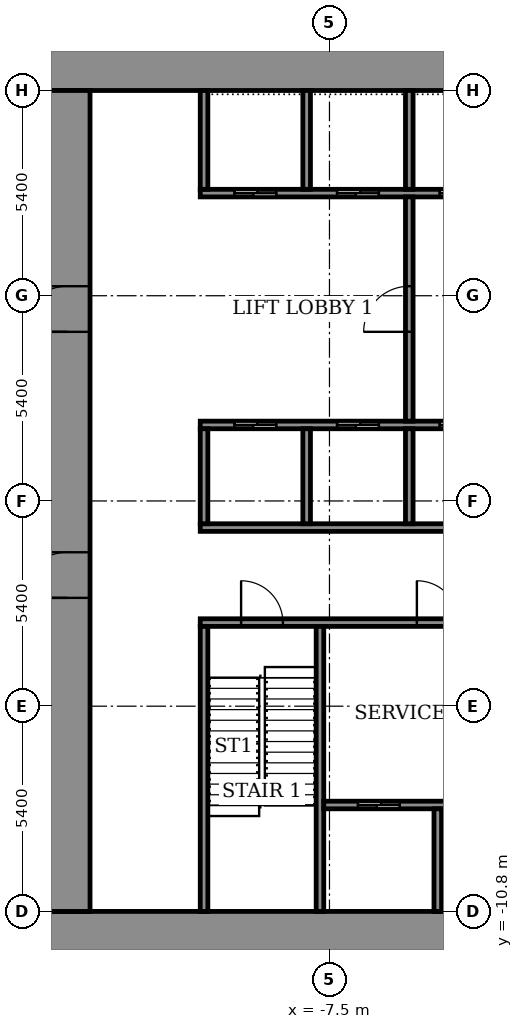
"""IFC4 building model, lengths in metres.
Left out: names, types, materials, properties, quantities, classifications, styles, units other than length and angle.
Written with IfcOpenShell. Run it as: python <this file> out.ifc"""

import sys

from ifc_helpers import new_model, si_unit, direction, frame, frame_2d, origin, place, context, subcontext, project, spatial, rectangle, extrude, element, fill, save


model = new_model("IFC4")
c1 = context("Model", 3, precision=1e-05, world=origin(), true_north=direction((0.0, 1.0)))
c2 = subcontext(c1, "Body", "Model", "MODEL_VIEW")
j1 = project(units=[si_unit("LENGTHUNIT", "METRE"), si_unit("PLANEANGLEUNIT", "RADIAN")], contexts=[c1])
p1 = place(None, origin())
s1 = spatial("IfcSite", under=j1, at=p1, CompositionType="ELEMENT")
p2 = place(p1, origin())
s2 = spatial("IfcBuilding", under=s1, at=p2, CompositionType="ELEMENT")
p3 = place(p2, frame((0.0, 0.0, 29.5)))
s3 = spatial("IfcBuildingStorey", under=s2, at=p3, CompositionType="ELEMENT", Elevation=29.5)
for number, where, z_axis, x_axis in (
    (1, (-15.0, -11.4, 0.0), (0.0, 0.0, 1.0), (1.0, 0.0, 0.0)),
    (2, (-15.0, 11.4, 0.0), (0.0, 0.0, 1.0), (1.0, 0.0, 0.0)),
):
    element("IfcWall", number, at=place(p3, frame(where, z_axis=z_axis, x_axis=x_axis)), inside=s3, PredefinedType="SHEAR", context=c2, shape_type="SweptSolid", body=[
        extrude(rectangle(XDim=30.0, YDim=1.2, at=frame_2d((15.0, 0.0))), origin(), (0.0, 0.0, 1.0), 4.6),
    ])
p4 = place(p3, frame((-14.4, -10.8, 0.0), z_axis=(0.0, 0.0, 1.0), x_axis=(0.0, 1.0, 0.0)))
e3 = element("IfcWall", 3, at=p4, inside=s3, PredefinedType="SHEAR", context=c2, shape_type="SweptSolid", body=[
    extrude(rectangle(XDim=21.6, YDim=1.2, at=frame_2d((10.8, 0.0))), origin(), (0.0, 0.0, 1.0), 4.6),
])
p5 = place(p4, frame((8.25, 0.0, 0.0)))
e4 = element("IfcOpeningElement", 4, at=p5, cuts=e3, PredefinedType="OPENING", context=c2, shape_type="SweptSolid", body=[
    extrude(rectangle(XDim=1.2, YDim=2.1, at=frame_2d((0.6, 1.05))), frame((0.0, 0.61, 0.0), z_axis=(0.0, -1.0, 0.0), x_axis=(1.0, 0.0, 0.0)), (0.0, 0.0, 1.0), 1.22),
])
p6 = place(p4, frame((15.25, 0.0, 0.0)))
e5 = element("IfcOpeningElement", 5, at=p6, cuts=e3, PredefinedType="OPENING", context=c2, shape_type="SweptSolid", body=[
    extrude(rectangle(XDim=1.2, YDim=2.1, at=frame_2d((0.6, 1.05))), frame((0.0, 0.61, 0.0), z_axis=(0.0, -1.0, 0.0), x_axis=(1.0, 0.0, 0.0)), (0.0, 0.0, 1.0), 1.22),
])
p7 = place(p3, frame((-10.9, -3.2, 0.0), z_axis=(0.0, 0.0, 1.0), x_axis=(1.0, 0.0, 0.0)))
e6 = element("IfcWall", 6, at=p7, inside=s3, PredefinedType="SHEAR", context=c2, shape_type="SweptSolid", body=[
    extrude(rectangle(XDim=21.8, YDim=0.2, at=frame_2d((10.9, 0.0))), origin(), (0.0, 0.0, 1.0), 4.05),
])
p8 = place(p7, frame((1.075, 0.0, 0.0)))
e7 = element("IfcOpeningElement", 7, at=p8, cuts=e6, PredefinedType="OPENING", context=c2, shape_type="SweptSolid", body=[
    extrude(rectangle(XDim=1.1, YDim=2.1, at=frame_2d((0.55, 1.05))), frame((0.0, 0.11, 0.0), z_axis=(0.0, -1.0, 0.0), x_axis=(1.0, 0.0, 0.0)), (0.0, 0.0, 1.0), 0.22),
])
p9 = place(p7, frame((10.325, 0.0, 0.0)))
e8 = element("IfcOpeningElement", 8, at=p9, cuts=e6, PredefinedType="OPENING", context=c2, shape_type="SweptSolid", body=[
    extrude(rectangle(XDim=1.1, YDim=2.1, at=frame_2d((0.55, 1.05))), frame((0.0, 0.11, 0.0), z_axis=(0.0, -1.0, 0.0), x_axis=(1.0, 0.0, 0.0)), (0.0, 0.0, 1.0), 0.22),
])
p10 = place(p7, frame((19.625, 0.0, 0.0)))
e9 = element("IfcOpeningElement", 9, at=p10, cuts=e6, PredefinedType="OPENING", context=c2, shape_type="SweptSolid", body=[
    extrude(rectangle(XDim=1.1, YDim=2.1, at=frame_2d((0.55, 1.05))), frame((0.0, 0.11, 0.0), z_axis=(0.0, -1.0, 0.0), x_axis=(1.0, 0.0, 0.0)), (0.0, 0.0, 1.0), 0.22),
])
p11 = place(p7, frame((5.7, 0.0, 0.0)))
e10 = element("IfcOpeningElement", 10, at=p11, cuts=e6, PredefinedType="OPENING", context=c2, shape_type="SweptSolid", body=[
    extrude(rectangle(XDim=1.1, YDim=2.1, at=frame_2d((0.55, 1.05))), frame((0.0, 0.11, 0.0), z_axis=(0.0, -1.0, 0.0), x_axis=(1.0, 0.0, 0.0)), (0.0, 0.0, 1.0), 0.22),
])
p12 = place(p7, frame((14.975, 0.0, 0.0)))
e11 = element("IfcOpeningElement", 11, at=p12, cuts=e6, PredefinedType="OPENING", context=c2, shape_type="SweptSolid", body=[
    extrude(rectangle(XDim=1.1, YDim=2.1, at=frame_2d((0.55, 1.05))), frame((0.0, 0.11, 0.0), z_axis=(0.0, -1.0, 0.0), x_axis=(1.0, 0.0, 0.0)), (0.0, 0.0, 1.0), 0.22),
])
p13 = place(p3, frame((-10.9, -0.7, 0.0), z_axis=(0.0, 0.0, 1.0), x_axis=(1.0, 0.0, 0.0)))
e12 = element("IfcWall", 12, at=p13, inside=s3, PredefinedType="SHEAR", context=c2, shape_type="SweptSolid", body=[
    extrude(rectangle(XDim=21.8, YDim=0.2, at=frame_2d((10.9, 0.0))), origin(), (0.0, 0.0, 1.0), 4.05),
])
p14 = place(p3, frame((-10.9, 2.0, 0.0), z_axis=(0.0, 0.0, 1.0), x_axis=(1.0, 0.0, 0.0)))
e13 = element("IfcWall", 13, at=p14, inside=s3, PredefinedType="SHEAR", context=c2, shape_type="SweptSolid", body=[
    extrude(rectangle(XDim=21.8, YDim=0.2, at=frame_2d((10.9, 0.0))), origin(), (0.0, 0.0, 1.0), 4.05),
])
p15 = place(p14, frame((0.9, 0.0, 0.0)))
e14 = element("IfcOpeningElement", 14, at=p15, cuts=e13, PredefinedType="OPENING", context=c2, shape_type="SweptSolid", body=[
    extrude(rectangle(XDim=1.1, YDim=2.1, at=frame_2d((0.55, 1.05))), frame((0.0, 0.11, 0.0), z_axis=(0.0, -1.0, 0.0), x_axis=(1.0, 0.0, 0.0)), (0.0, 0.0, 1.0), 0.22),
])
p16 = place(p14, frame((3.6, 0.0, 0.0)))
e15 = element("IfcOpeningElement", 15, at=p16, cuts=e13, PredefinedType="OPENING", context=c2, shape_type="SweptSolid", body=[
    extrude(rectangle(XDim=1.1, YDim=2.1, at=frame_2d((0.55, 1.05))), frame((0.0, 0.11, 0.0), z_axis=(0.0, -1.0, 0.0), x_axis=(1.0, 0.0, 0.0)), (0.0, 0.0, 1.0), 0.22),
])
p17 = place(p14, frame((6.3, 0.0, 0.0)))
e16 = element("IfcOpeningElement", 16, at=p17, cuts=e13, PredefinedType="OPENING", context=c2, shape_type="SweptSolid", body=[
    extrude(rectangle(XDim=1.1, YDim=2.1, at=frame_2d((0.55, 1.05))), frame((0.0, 0.11, 0.0), z_axis=(0.0, -1.0, 0.0), x_axis=(1.0, 0.0, 0.0)), (0.0, 0.0, 1.0), 0.22),
])
p18 = place(p14, frame((9.0, 0.0, 0.0)))
e17 = element("IfcOpeningElement", 17, at=p18, cuts=e13, PredefinedType="OPENING", context=c2, shape_type="SweptSolid", body=[
    extrude(rectangle(XDim=1.1, YDim=2.1, at=frame_2d((0.55, 1.05))), frame((0.0, 0.11, 0.0), z_axis=(0.0, -1.0, 0.0), x_axis=(1.0, 0.0, 0.0)), (0.0, 0.0, 1.0), 0.22),
])
p19 = place(p14, frame((11.7, 0.0, 0.0)))
e18 = element("IfcOpeningElement", 18, at=p19, cuts=e13, PredefinedType="OPENING", context=c2, shape_type="SweptSolid", body=[
    extrude(rectangle(XDim=1.1, YDim=2.1, at=frame_2d((0.55, 1.05))), frame((0.0, 0.11, 0.0), z_axis=(0.0, -1.0, 0.0), x_axis=(1.0, 0.0, 0.0)), (0.0, 0.0, 1.0), 0.22),
])
p20 = place(p14, frame((15.175, 0.0, 0.0)))
e19 = element("IfcOpeningElement", 19, at=p20, cuts=e13, PredefinedType="OPENING", context=c2, shape_type="SweptSolid", body=[
    extrude(rectangle(XDim=0.9, YDim=2.1, at=frame_2d((0.45, 1.05))), frame((0.0, 0.11, 0.0), z_axis=(0.0, -1.0, 0.0), x_axis=(1.0, 0.0, 0.0)), (0.0, 0.0, 1.0), 0.22),
])
p21 = place(p14, frame((19.225, 0.0, 0.0)))
e20 = element("IfcOpeningElement", 20, at=p21, cuts=e13, PredefinedType="OPENING", context=c2, shape_type="SweptSolid", body=[
    extrude(rectangle(XDim=0.9, YDim=2.1, at=frame_2d((0.45, 1.05))), frame((0.0, 0.11, 0.0), z_axis=(0.0, -1.0, 0.0), x_axis=(1.0, 0.0, 0.0)), (0.0, 0.0, 1.0), 0.22),
])
p22 = place(p3, frame((-10.9, 8.1, 0.0), z_axis=(0.0, 0.0, 1.0), x_axis=(1.0, 0.0, 0.0)))
e21 = element("IfcWall", 21, at=p22, inside=s3, PredefinedType="SHEAR", context=c2, shape_type="SweptSolid", body=[
    extrude(rectangle(XDim=21.8, YDim=0.2, at=frame_2d((10.9, 0.0))), origin(), (0.0, 0.0, 1.0), 4.05),
])
p23 = place(p22, frame((0.9, 0.0, 0.0)))
e22 = element("IfcOpeningElement", 22, at=p23, cuts=e21, PredefinedType="OPENING", context=c2, shape_type="SweptSolid", body=[
    extrude(rectangle(XDim=1.1, YDim=2.1, at=frame_2d((0.55, 1.05))), frame((0.0, 0.11, 0.0), z_axis=(0.0, -1.0, 0.0), x_axis=(1.0, 0.0, 0.0)), (0.0, 0.0, 1.0), 0.22),
])
p24 = place(p22, frame((3.6, 0.0, 0.0)))
e23 = element("IfcOpeningElement", 23, at=p24, cuts=e21, PredefinedType="OPENING", context=c2, shape_type="SweptSolid", body=[
    extrude(rectangle(XDim=1.1, YDim=2.1, at=frame_2d((0.55, 1.05))), frame((0.0, 0.11, 0.0), z_axis=(0.0, -1.0, 0.0), x_axis=(1.0, 0.0, 0.0)), (0.0, 0.0, 1.0), 0.22),
])
p25 = place(p22, frame((6.3, 0.0, 0.0)))
e24 = element("IfcOpeningElement", 24, at=p25, cuts=e21, PredefinedType="OPENING", context=c2, shape_type="SweptSolid", body=[
    extrude(rectangle(XDim=1.1, YDim=2.1, at=frame_2d((0.55, 1.05))), frame((0.0, 0.11, 0.0), z_axis=(0.0, -1.0, 0.0), x_axis=(1.0, 0.0, 0.0)), (0.0, 0.0, 1.0), 0.22),
])
p26 = place(p22, frame((9.0, 0.0, 0.0)))
e25 = element("IfcOpeningElement", 25, at=p26, cuts=e21, PredefinedType="OPENING", context=c2, shape_type="SweptSolid", body=[
    extrude(rectangle(XDim=1.1, YDim=2.1, at=frame_2d((0.55, 1.05))), frame((0.0, 0.11, 0.0), z_axis=(0.0, -1.0, 0.0), x_axis=(1.0, 0.0, 0.0)), (0.0, 0.0, 1.0), 0.22),
])
p27 = place(p22, frame((11.7, 0.0, 0.0)))
e26 = element("IfcOpeningElement", 26, at=p27, cuts=e21, PredefinedType="OPENING", context=c2, shape_type="SweptSolid", body=[
    extrude(rectangle(XDim=1.1, YDim=2.1, at=frame_2d((0.55, 1.05))), frame((0.0, 0.11, 0.0), z_axis=(0.0, -1.0, 0.0), x_axis=(1.0, 0.0, 0.0)), (0.0, 0.0, 1.0), 0.22),
])
p28 = place(p22, frame((15.175, 0.0, 0.0)))
e27 = element("IfcOpeningElement", 27, at=p28, cuts=e21, PredefinedType="OPENING", context=c2, shape_type="SweptSolid", body=[
    extrude(rectangle(XDim=0.9, YDim=2.1, at=frame_2d((0.45, 1.05))), frame((0.0, 0.11, 0.0), z_axis=(0.0, -1.0, 0.0), x_axis=(1.0, 0.0, 0.0)), (0.0, 0.0, 1.0), 0.22),
])
p29 = place(p22, frame((19.225, 0.0, 0.0)))
e28 = element("IfcOpeningElement", 28, at=p29, cuts=e21, PredefinedType="OPENING", context=c2, shape_type="SweptSolid", body=[
    extrude(rectangle(XDim=0.9, YDim=2.1, at=frame_2d((0.45, 1.05))), frame((0.0, 0.11, 0.0), z_axis=(0.0, -1.0, 0.0), x_axis=(1.0, 0.0, 0.0)), (0.0, 0.0, 1.0), 0.22),
])
for number, where, z_axis, x_axis in (
    (29, (-10.8, -10.8, 0.0), (0.0, 0.0, 1.0), (0.0, 1.0, 0.0)),
    (30, (-7.75, -10.8, 0.0), (0.0, 0.0, 1.0), (0.0, 1.0, 0.0)),
):
    element("IfcWall", number, at=place(p3, frame(where, z_axis=z_axis, x_axis=x_axis)), inside=s3, PredefinedType="SHEAR", context=c2, shape_type="SweptSolid", body=[
        extrude(rectangle(XDim=7.5, YDim=0.2, at=frame_2d((3.75, 0.0))), origin(), (0.0, 0.0, 1.0), 4.05),
    ])
p30 = place(p3, frame((-7.65, -8.0, 0.0), z_axis=(0.0, 0.0, 1.0), x_axis=(1.0, 0.0, 0.0)))
e31 = element("IfcWall", 31, at=p30, inside=s3, PredefinedType="SHEAR", context=c2, shape_type="SweptSolid", body=[
    extrude(rectangle(XDim=6.0, YDim=0.2, at=frame_2d((3.0, 0.0))), origin(), (0.0, 0.0, 1.0), 4.05),
])
p31 = place(p30, frame((0.9, 0.0, 0.0)))
e32 = element("IfcOpeningElement", 32, at=p31, cuts=e31, PredefinedType="OPENING", context=c2, shape_type="SweptSolid", body=[
    extrude(rectangle(XDim=1.1, YDim=2.1, at=frame_2d((0.55, 1.05))), frame((0.0, 0.11, 0.0), z_axis=(0.0, -1.0, 0.0), x_axis=(1.0, 0.0, 0.0)), (0.0, 0.0, 1.0), 0.22),
])
p32 = place(p30, frame((4.0, 0.0, 0.0)))
e33 = element("IfcOpeningElement", 33, at=p32, cuts=e31, PredefinedType="OPENING", context=c2, shape_type="SweptSolid", body=[
    extrude(rectangle(XDim=1.1, YDim=2.1, at=frame_2d((0.55, 1.05))), frame((0.0, 0.11, 0.0), z_axis=(0.0, -1.0, 0.0), x_axis=(1.0, 0.0, 0.0)), (0.0, 0.0, 1.0), 0.22),
])
p33 = place(p3, frame((-4.65, -10.8, 0.0), z_axis=(0.0, 0.0, 1.0), x_axis=(0.0, 1.0, 0.0)))
e34 = element("IfcWall", 34, at=p33, inside=s3, PredefinedType="SHEAR", context=c2, shape_type="SweptSolid", body=[
    extrude(rectangle(XDim=2.7, YDim=0.2, at=frame_2d((1.35, 0.0))), origin(), (0.0, 0.0, 1.0), 4.05),
])
for number, where, z_axis, x_axis in (
    (35, (-10.8, -0.6, 0.0), (0.0, 0.0, 1.0), (0.0, 1.0, 0.0)),
    (36, (-8.1, -0.6, 0.0), (0.0, 0.0, 1.0), (0.0, 1.0, 0.0)),
    (37, (-5.4, -0.6, 0.0), (0.0, 0.0, 1.0), (0.0, 1.0, 0.0)),
):
    element("IfcWall", number, at=place(p3, frame(where, z_axis=z_axis, x_axis=x_axis)), inside=s3, PredefinedType="SHEAR", context=c2, shape_type="SweptSolid", body=[
        extrude(rectangle(XDim=2.5, YDim=0.2, at=frame_2d((1.25, 0.0))), origin(), (0.0, 0.0, 1.0), 4.05),
    ])
for number, where, z_axis, x_axis in (
    (38, (-10.8, 8.2, 0.0), (0.0, 0.0, 1.0), (0.0, 1.0, 0.0)),
    (39, (-8.1, 8.2, 0.0), (0.0, 0.0, 1.0), (0.0, 1.0, 0.0)),
    (40, (-5.4, 8.2, 0.0), (0.0, 0.0, 1.0), (0.0, 1.0, 0.0)),
):
    element("IfcWall", number, at=place(p3, frame(where, z_axis=z_axis, x_axis=x_axis)), inside=s3, PredefinedType="SHEAR", context=c2, shape_type="SweptSolid", body=[
        extrude(rectangle(XDim=2.6, YDim=0.2, at=frame_2d((1.3, 0.0))), origin(), (0.0, 0.0, 1.0), 4.05),
    ])
p34 = place(p3, frame((-5.4, 2.1, 0.0), z_axis=(0.0, 0.0, 1.0), x_axis=(0.0, 1.0, 0.0)))
e41 = element("IfcWall", 41, at=p34, inside=s3, PredefinedType="STANDARD", context=c2, shape_type="SweptSolid", body=[
    extrude(rectangle(XDim=5.9, YDim=0.2, at=frame_2d((2.95, 0.0))), origin(), (0.0, 0.0, 1.0), 4.05),
])
p35 = place(p34, frame((2.35, 0.0, 0.0)))
e42 = element("IfcOpeningElement", 42, at=p35, cuts=e41, PredefinedType="OPENING", context=c2, shape_type="SweptSolid", body=[
    extrude(rectangle(XDim=1.2, YDim=2.1, at=frame_2d((0.6, 1.05))), frame((0.0, 0.11, 0.0), z_axis=(0.0, -1.0, 0.0), x_axis=(1.0, 0.0, 0.0)), (0.0, 0.0, 1.0), 0.22),
])
p36 = place(p5, origin())
e43 = element("IfcDoor", 43, at=p36, inside=s3, OperationType="DOUBLE_DOOR_SINGLE_SWING", PredefinedType="DOOR", context=c2, shape_type="SweptSolid", body=[
    extrude(rectangle(XDim=1.2, YDim=2.1, at=frame_2d((0.6, 1.05))), frame((0.0, 0.025, 0.0), z_axis=(0.0, -1.0, 0.0), x_axis=(1.0, 0.0, 0.0)), (0.0, 0.0, 1.0), 0.05),
])
fill(e4, e43)
p37 = place(p6, origin())
e44 = element("IfcDoor", 44, at=p37, inside=s3, OperationType="DOUBLE_DOOR_SINGLE_SWING", PredefinedType="DOOR", context=c2, shape_type="SweptSolid", body=[
    extrude(rectangle(XDim=1.2, YDim=2.1, at=frame_2d((0.6, 1.05))), frame((0.0, 0.025, 0.0), z_axis=(0.0, -1.0, 0.0), x_axis=(1.0, 0.0, 0.0)), (0.0, 0.0, 1.0), 0.05),
])
fill(e5, e44)
p38 = place(p15, origin())
e45 = element("IfcDoor", 45, at=p38, inside=s3, OperationType="SLIDING_TO_LEFT", PredefinedType="DOOR", context=c2, shape_type="SweptSolid", body=[
    extrude(rectangle(XDim=1.1, YDim=2.1, at=frame_2d((0.55, 1.05))), frame((0.0, 0.025, 0.0), z_axis=(0.0, -1.0, 0.0), x_axis=(1.0, 0.0, 0.0)), (0.0, 0.0, 1.0), 0.05),
])
fill(e14, e45)
p39 = place(p16, origin())
e46 = element("IfcDoor", 46, at=p39, inside=s3, OperationType="SLIDING_TO_LEFT", PredefinedType="DOOR", context=c2, shape_type="SweptSolid", body=[
    extrude(rectangle(XDim=1.1, YDim=2.1, at=frame_2d((0.55, 1.05))), frame((0.0, 0.025, 0.0), z_axis=(0.0, -1.0, 0.0), x_axis=(1.0, 0.0, 0.0)), (0.0, 0.0, 1.0), 0.05),
])
fill(e15, e46)
p40 = place(p17, origin())
e47 = element("IfcDoor", 47, at=p40, inside=s3, OperationType="SLIDING_TO_LEFT", PredefinedType="DOOR", context=c2, shape_type="SweptSolid", body=[
    extrude(rectangle(XDim=1.1, YDim=2.1, at=frame_2d((0.55, 1.05))), frame((0.0, 0.025, 0.0), z_axis=(0.0, -1.0, 0.0), x_axis=(1.0, 0.0, 0.0)), (0.0, 0.0, 1.0), 0.05),
])
fill(e16, e47)
p41 = place(p23, origin())
e48 = element("IfcDoor", 48, at=p41, inside=s3, OperationType="SLIDING_TO_LEFT", PredefinedType="DOOR", context=c2, shape_type="SweptSolid", body=[
    extrude(rectangle(XDim=1.1, YDim=2.1, at=frame_2d((0.55, 1.05))), frame((0.0, 0.025, 0.0), z_axis=(0.0, -1.0, 0.0), x_axis=(1.0, 0.0, 0.0)), (0.0, 0.0, 1.0), 0.05),
])
fill(e22, e48)
p42 = place(p24, origin())
e49 = element("IfcDoor", 49, at=p42, inside=s3, OperationType="SLIDING_TO_LEFT", PredefinedType="DOOR", context=c2, shape_type="SweptSolid", body=[
    extrude(rectangle(XDim=1.1, YDim=2.1, at=frame_2d((0.55, 1.05))), frame((0.0, 0.025, 0.0), z_axis=(0.0, -1.0, 0.0), x_axis=(1.0, 0.0, 0.0)), (0.0, 0.0, 1.0), 0.05),
])
fill(e23, e49)
p43 = place(p25, origin())
e50 = element("IfcDoor", 50, at=p43, inside=s3, OperationType="SLIDING_TO_LEFT", PredefinedType="DOOR", context=c2, shape_type="SweptSolid", body=[
    extrude(rectangle(XDim=1.1, YDim=2.1, at=frame_2d((0.55, 1.05))), frame((0.0, 0.025, 0.0), z_axis=(0.0, -1.0, 0.0), x_axis=(1.0, 0.0, 0.0)), (0.0, 0.0, 1.0), 0.05),
])
fill(e24, e50)
p44 = place(p31, origin())
e51 = element("IfcDoor", 51, at=p44, inside=s3, OperationType="SLIDING_TO_LEFT", PredefinedType="DOOR", context=c2, shape_type="SweptSolid", body=[
    extrude(rectangle(XDim=1.1, YDim=2.1, at=frame_2d((0.55, 1.05))), frame((0.0, 0.025, 0.0), z_axis=(0.0, -1.0, 0.0), x_axis=(1.0, 0.0, 0.0)), (0.0, 0.0, 1.0), 0.05),
])
fill(e32, e51)
p45 = place(p8, origin())
e52 = element("IfcDoor", 52, at=p45, inside=s3, OperationType="SINGLE_SWING_RIGHT", PredefinedType="DOOR", context=c2, shape_type="SweptSolid", body=[
    extrude(rectangle(XDim=1.1, YDim=2.1, at=frame_2d((0.55, 1.05))), frame((0.0, 0.025, 0.0), z_axis=(0.0, -1.0, 0.0), x_axis=(1.0, 0.0, 0.0)), (0.0, 0.0, 1.0), 0.05),
])
fill(e7, e52)
p46 = place(p11, origin())
e53 = element("IfcDoor", 53, at=p46, inside=s3, OperationType="SINGLE_SWING_LEFT", PredefinedType="DOOR", context=c2, shape_type="SweptSolid", body=[
    extrude(rectangle(XDim=1.1, YDim=2.1, at=frame_2d((0.55, 1.05))), frame((0.0, 0.025, 0.0), z_axis=(0.0, -1.0, 0.0), x_axis=(1.0, 0.0, 0.0)), (0.0, 0.0, 1.0), 0.05),
])
fill(e10, e53)
p47 = place(p35, origin())
e54 = element("IfcDoor", 54, at=p47, inside=s3, OperationType="SINGLE_SWING_LEFT", PredefinedType="DOOR", context=c2, shape_type="SweptSolid", body=[
    extrude(rectangle(XDim=1.2, YDim=2.1, at=frame_2d((0.6, 1.05))), frame((0.0, 0.025, 0.0), z_axis=(0.0, -1.0, 0.0), x_axis=(1.0, 0.0, 0.0)), (0.0, 0.0, 1.0), 0.05),
])
fill(e42, e54)
save(model, sys.argv[1])
